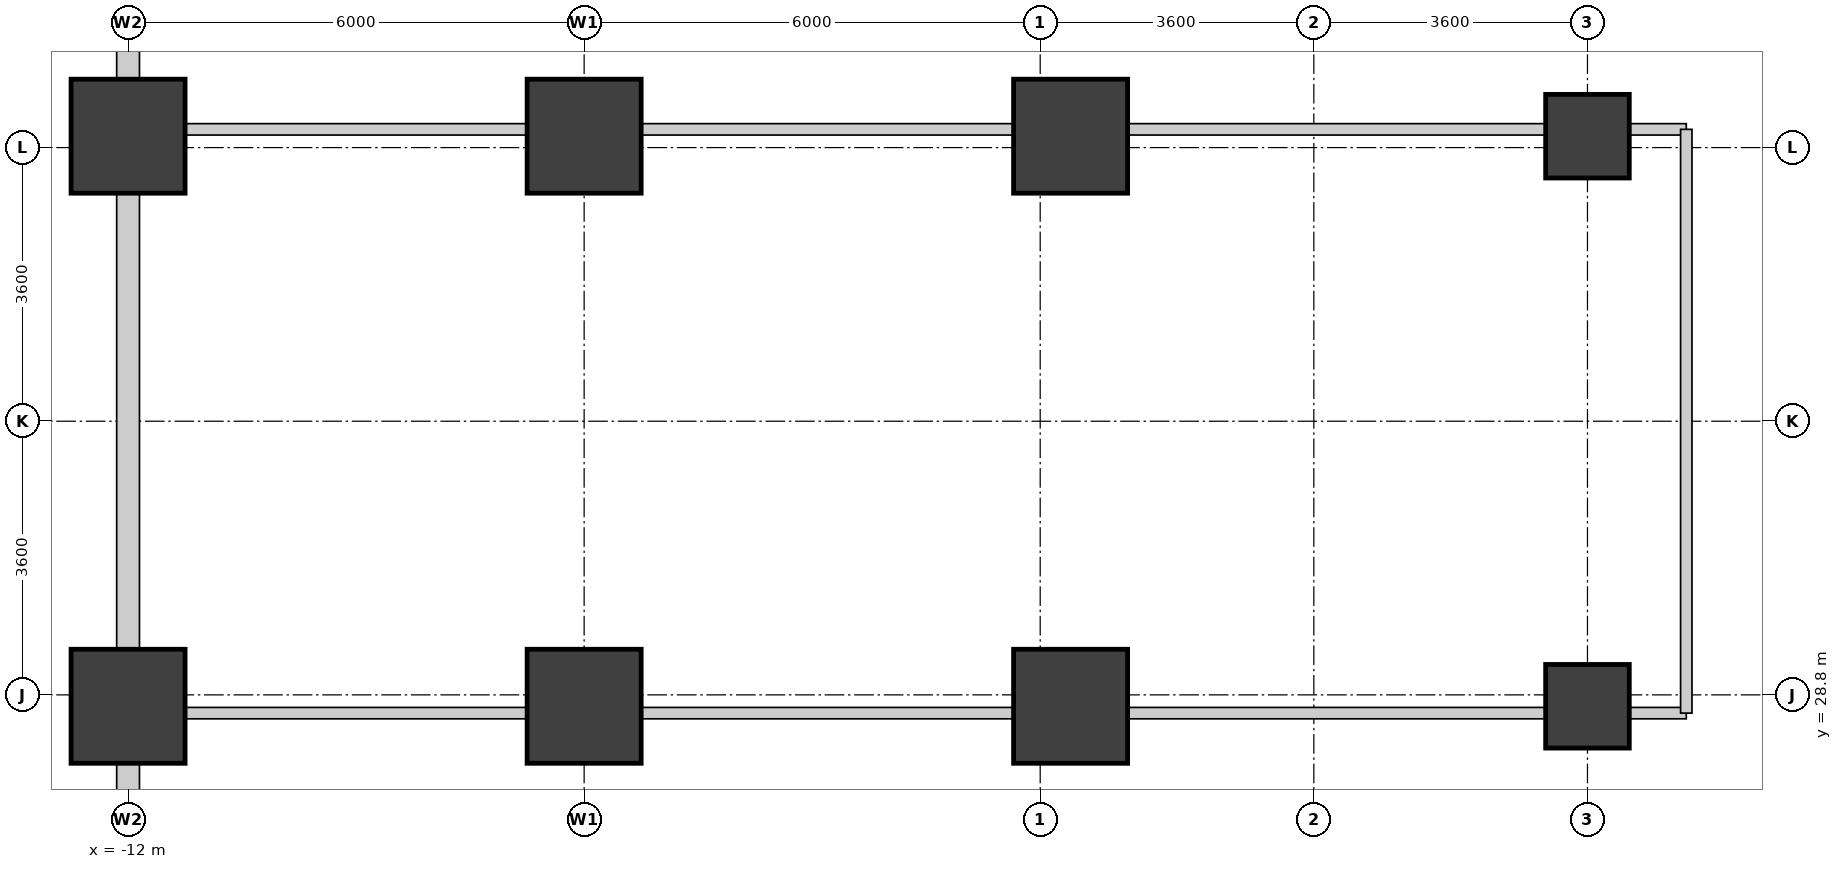
"""IFC4 building model, lengths in metres.
Left out: names, types, materials, properties, quantities, classifications, styles, units other than length and angle.
Written with IfcOpenShell. Run it as: python <this file> out.ifc"""

import sys

from ifc_helpers import new_model, si_unit, direction, frame, frame_2d, origin, origin_2d, place, context, subcontext, project, spatial, rectangle, circle, extrude, source, transform, mapped, element, fill, save


model = new_model("IFC4")
c1 = context("Model", 3, precision=1e-05, world=origin(), true_north=direction((0.0, 1.0)))
c2 = subcontext(c1, "Body", "Model", "MODEL_VIEW")
j1 = project(units=[si_unit("LENGTHUNIT", "METRE"), si_unit("PLANEANGLEUNIT", "RADIAN")], contexts=[c1])
p1 = place(None, origin())
s1 = spatial("IfcSite", under=j1, at=p1, CompositionType="ELEMENT")
p2 = place(p1, origin())
s2 = spatial("IfcBuilding", under=s1, at=p2, CompositionType="ELEMENT")
p3 = place(p2, origin())
s3 = spatial("IfcBuildingStorey", under=s2, at=p3, CompositionType="ELEMENT", Elevation=0.0)
m1 = source(origin(), c2, "Body", "SweptSolid", [
    extrude(circle(Radius=0.55, at=origin_2d()), origin(), (0.0, 0.0, 1.0), 5.4),
])
for number, where, z_axis, x_axis in (
    (1, (7.2, 28.65, 0.0), (0.0, 0.0, 1.0), (1.0, 0.0, 0.0)),
    (2, (7.2, 36.15, 0.0), (0.0, 0.0, 1.0), (1.0, 0.0, 0.0)),
):
    element("IfcColumn", number, at=place(p3, frame(where, z_axis=z_axis, x_axis=x_axis)), inside=s3, PredefinedType="COLUMN", context=c2, shape_type="MappedRepresentation", body=[
        mapped(m1, transform((0.0, 0.0, 0.0), x_axis=(1.0, 0.0, 0.0), y_axis=(0.0, 1.0, 0.0), z_axis=(0.0, 0.0, 1.0), scale=1.0)),
    ])
m2 = source(origin(), c2, "Body", "SweptSolid", [
    extrude(rectangle(XDim=1.5, YDim=1.5, at=origin_2d()), origin(), (0.0, 0.0, 1.0), 5.4),
])
for number, where, z_axis, x_axis in (
    (3, (0.4, 28.65, 0.0), (0.0, 0.0, 1.0), (1.0, 0.0, 0.0)),
    (4, (0.4, 36.15, 0.0), (0.0, 0.0, 1.0), (1.0, 0.0, 0.0)),
    (5, (-12.0, 28.65, 0.0), (0.0, 0.0, 1.0), (1.0, 0.0, 0.0)),
    (6, (-12.0, 36.15, 0.0), (0.0, 0.0, 1.0), (1.0, 0.0, 0.0)),
    (7, (-6.0, 28.65, 0.0), (0.0, 0.0, 1.0), (1.0, 0.0, 0.0)),
    (8, (-6.0, 36.15, 0.0), (0.0, 0.0, 1.0), (1.0, 0.0, 0.0)),
):
    element("IfcColumn", number, at=place(p3, frame(where, z_axis=z_axis, x_axis=x_axis)), inside=s3, PredefinedType="COLUMN", context=c2, shape_type="MappedRepresentation", body=[
        mapped(m2, transform((0.0, 0.0, 0.0), x_axis=(1.0, 0.0, 0.0), y_axis=(0.0, 1.0, 0.0), z_axis=(0.0, 0.0, 1.0), scale=1.0)),
    ])
p4 = place(p3, frame((-12.0, 36.901, 0.0), z_axis=(0.0, 0.0, 1.0), x_axis=(0.0, 1.0, 0.0)))
e9 = element("IfcWall", 9, at=p4, inside=s3, PredefinedType="STANDARD", context=c2, shape_type="SweptSolid", body=[
    extrude(rectangle(XDim=7.198, YDim=0.3, at=frame_2d((3.599, 0.0))), origin(), (0.0, 0.0, 1.0), 4.5),
])
p5 = place(p4, frame((4.198, 0.0, 0.9)))
e10 = element("IfcOpeningElement", 10, at=p5, cuts=e9, PredefinedType="OPENING", context=c2, shape_type="SweptSolid", body=[
    extrude(rectangle(XDim=2.4, YDim=2.5, at=frame_2d((1.2, 1.25))), frame((0.0, 0.16, 0.0), z_axis=(0.0, -1.0, 0.0), x_axis=(1.0, 0.0, 0.0)), (0.0, 0.0, 1.0), 0.32),
])
p6 = place(p4, frame((2.548, 0.0, 0.9)))
e11 = element("IfcOpeningElement", 11, at=p6, cuts=e9, PredefinedType="OPENING", context=c2, shape_type="SweptSolid", body=[
    extrude(rectangle(XDim=0.95, YDim=1.75, at=frame_2d((0.475, 0.875))), frame((0.0, 0.16, 0.0), z_axis=(0.0, -1.0, 0.0), x_axis=(1.0, 0.0, 0.0)), (0.0, 0.0, 1.0), 0.32),
])
p7 = place(p3, frame((-12.0, 29.401, 0.0), z_axis=(0.0, 0.0, 1.0), x_axis=(0.0, 1.0, 0.0)))
e12 = element("IfcWall", 12, at=p7, inside=s3, PredefinedType="STANDARD", context=c2, shape_type="SweptSolid", body=[
    extrude(rectangle(XDim=5.998, YDim=0.3, at=frame_2d((2.999, 0.0))), origin(), (0.0, 0.0, 1.0), 4.5),
])
p8 = place(p7, frame((2.074, 0.0, 0.0)))
e13 = element("IfcOpeningElement", 13, at=p8, cuts=e12, PredefinedType="OPENING", context=c2, shape_type="SweptSolid", body=[
    extrude(rectangle(XDim=1.85, YDim=2.25, at=frame_2d((0.925, 1.125))), frame((0.0, 0.16, 0.0), z_axis=(0.0, -1.0, 0.0), x_axis=(1.0, 0.0, 0.0)), (0.0, 0.0, 1.0), 0.32),
])
p9 = place(p3, frame((-12.0, 18.751, 0.0), z_axis=(0.0, 0.0, 1.0), x_axis=(0.0, 1.0, 0.0)))
e14 = element("IfcWall", 14, at=p9, inside=s3, PredefinedType="STANDARD", context=c2, shape_type="SweptSolid", body=[
    extrude(rectangle(XDim=9.148, YDim=0.3, at=frame_2d((4.574, 0.0))), origin(), (0.0, 0.0, 1.0), 4.5),
])
p10 = place(p9, frame((0.325, 0.0, 0.9)))
e15 = element("IfcOpeningElement", 15, at=p10, cuts=e14, PredefinedType="OPENING", context=c2, shape_type="SweptSolid", body=[
    extrude(rectangle(XDim=2.4, YDim=2.5, at=frame_2d((1.2, 1.25))), frame((0.0, 0.16, 0.0), z_axis=(0.0, -1.0, 0.0), x_axis=(1.0, 0.0, 0.0)), (0.0, 0.0, 1.0), 0.32),
])
p11 = place(p9, frame((3.374, 0.0, 0.9)))
e16 = element("IfcOpeningElement", 16, at=p11, cuts=e14, PredefinedType="OPENING", context=c2, shape_type="SweptSolid", body=[
    extrude(rectangle(XDim=2.4, YDim=2.5, at=frame_2d((1.2, 1.25))), frame((0.0, 0.16, 0.0), z_axis=(0.0, -1.0, 0.0), x_axis=(1.0, 0.0, 0.0)), (0.0, 0.0, 1.0), 0.32),
])
p12 = place(p3, frame((-11.25, 28.56, 0.0), z_axis=(0.0, 0.0, 1.0), x_axis=(1.0, 0.0, 0.0)))
e17 = element("IfcWall", 17, at=p12, inside=s3, PredefinedType="PARTITIONING", context=c2, shape_type="SweptSolid", body=[
    extrude(rectangle(XDim=4.5, YDim=0.15, at=frame_2d((2.25, 0.0))), origin(), (0.0, 0.0, 1.0), 4.4),
])
p13 = place(p12, frame((1.6, 0.0, 0.0)))
e18 = element("IfcOpeningElement", 18, at=p13, cuts=e17, PredefinedType="OPENING", context=c2, shape_type="SweptSolid", body=[
    extrude(rectangle(XDim=1.3, YDim=2.12, at=frame_2d((0.65, 1.06))), frame((0.0, 0.085, 0.0), z_axis=(0.0, -1.0, 0.0), x_axis=(1.0, 0.0, 0.0)), (0.0, 0.0, 1.0), 0.17),
])
p14 = place(p3, frame((-5.25, 28.56, 0.0), z_axis=(0.0, 0.0, 1.0), x_axis=(1.0, 0.0, 0.0)))
e19 = element("IfcWall", 19, at=p14, inside=s3, PredefinedType="PARTITIONING", context=c2, shape_type="SweptSolid", body=[
    extrude(rectangle(XDim=4.9, YDim=0.15, at=frame_2d((2.45, 0.0))), origin(), (0.0, 0.0, 1.0), 4.4),
])
p15 = place(p3, frame((1.15, 28.56, 0.0), z_axis=(0.0, 0.0, 1.0), x_axis=(1.0, 0.0, 0.0)))
e20 = element("IfcWall", 20, at=p15, inside=s3, PredefinedType="PARTITIONING", context=c2, shape_type="SweptSolid", body=[
    extrude(rectangle(XDim=5.5, YDim=0.15, at=frame_2d((2.75, 0.0))), origin(), (0.0, 0.0, 1.0), 4.4),
])
p16 = place(p3, frame((7.75, 28.56, 0.0), z_axis=(0.0, 0.0, 1.0), x_axis=(1.0, 0.0, 0.0)))
e21 = element("IfcWall", 21, at=p16, inside=s3, PredefinedType="PARTITIONING", context=c2, shape_type="SweptSolid", body=[
    extrude(rectangle(XDim=0.75, YDim=0.15, at=frame_2d((0.375, 0.0))), origin(), (0.0, 0.0, 1.0), 4.4),
])
p17 = place(p3, frame((-11.25, 36.24, 0.0), z_axis=(0.0, 0.0, 1.0), x_axis=(1.0, 0.0, 0.0)))
e22 = element("IfcWall", 22, at=p17, inside=s3, PredefinedType="PARTITIONING", context=c2, shape_type="SweptSolid", body=[
    extrude(rectangle(XDim=4.5, YDim=0.15, at=frame_2d((2.25, 0.0))), origin(), (0.0, 0.0, 1.0), 4.4),
])
p18 = place(p3, frame((-5.25, 36.24, 0.0), z_axis=(0.0, 0.0, 1.0), x_axis=(1.0, 0.0, 0.0)))
e23 = element("IfcWall", 23, at=p18, inside=s3, PredefinedType="PARTITIONING", context=c2, shape_type="SweptSolid", body=[
    extrude(rectangle(XDim=4.9, YDim=0.15, at=frame_2d((2.45, 0.0))), origin(), (0.0, 0.0, 1.0), 4.4),
])
p19 = place(p3, frame((1.15, 36.24, 0.0), z_axis=(0.0, 0.0, 1.0), x_axis=(1.0, 0.0, 0.0)))
e24 = element("IfcWall", 24, at=p19, inside=s3, PredefinedType="PARTITIONING", context=c2, shape_type="SweptSolid", body=[
    extrude(rectangle(XDim=5.5, YDim=0.15, at=frame_2d((2.75, 0.0))), origin(), (0.0, 0.0, 1.0), 4.4),
])
p20 = place(p3, frame((7.75, 36.24, 0.0), z_axis=(0.0, 0.0, 1.0), x_axis=(1.0, 0.0, 0.0)))
e25 = element("IfcWall", 25, at=p20, inside=s3, PredefinedType="PARTITIONING", context=c2, shape_type="SweptSolid", body=[
    extrude(rectangle(XDim=0.75, YDim=0.15, at=frame_2d((0.375, 0.0))), origin(), (0.0, 0.0, 1.0), 4.4),
])
p21 = place(p3, frame((8.5, 28.56, 0.0), z_axis=(0.0, 0.0, 1.0), x_axis=(0.0, 1.0, 0.0)))
e26 = element("IfcWall", 26, at=p21, inside=s3, PredefinedType="PARTITIONING", context=c2, shape_type="SweptSolid", body=[
    extrude(rectangle(XDim=7.68, YDim=0.15, at=frame_2d((3.84, 0.0))), origin(), (0.0, 0.0, 1.0), 5.1),
])
p22 = place(p8, origin())
e27 = element("IfcDoor", 27, at=p22, inside=s3, OperationType="DOUBLE_DOOR_SINGLE_SWING", PredefinedType="DOOR", context=c2, shape_type="SweptSolid", body=[
    extrude(rectangle(XDim=1.85, YDim=2.25, at=frame_2d((0.925, 1.125))), frame((0.0, 0.025, 0.0), z_axis=(0.0, -1.0, 0.0), x_axis=(1.0, 0.0, 0.0)), (0.0, 0.0, 1.0), 0.05),
])
fill(e13, e27)
p23 = place(p13, origin())
e28 = element("IfcDoor", 28, at=p23, inside=s3, OperationType="DOUBLE_DOOR_SINGLE_SWING", PredefinedType="DOOR", context=c2, shape_type="SweptSolid", body=[
    extrude(rectangle(XDim=1.3, YDim=2.12, at=frame_2d((0.65, 1.06))), frame((0.0, 0.025, 0.0), z_axis=(0.0, -1.0, 0.0), x_axis=(1.0, 0.0, 0.0)), (0.0, 0.0, 1.0), 0.05),
])
fill(e18, e28)
save(model, sys.argv[1])
